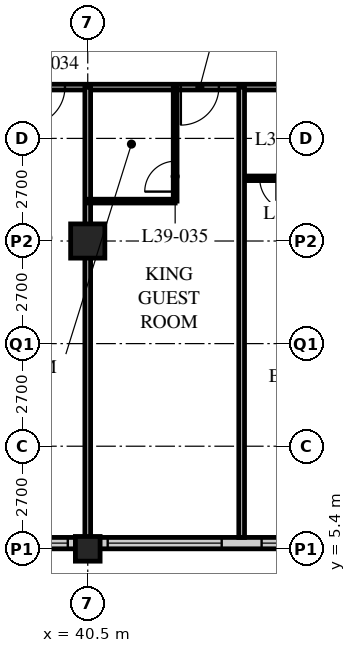
"""IFC4 building model, lengths in metres.
Left out: names, types, materials, properties, quantities, classifications, styles, units other than length and angle.
Written with IfcOpenShell. Run it as: python <this file> out.ifc"""

import sys

from ifc_helpers import new_model, si_unit, direction, frame, frame_2d, origin, origin_2d, place, context, subcontext, project, spatial, rectangle, hollow_rectangle, extrude, element, fill, save


model = new_model("IFC4")
c1 = context("Model", 3, precision=1e-05, world=origin(), true_north=direction((0.0, 1.0)))
c2 = subcontext(c1, "Body", "Model", "MODEL_VIEW")
j1 = project(units=[si_unit("LENGTHUNIT", "METRE"), si_unit("PLANEANGLEUNIT", "RADIAN")], contexts=[c1])
p1 = place(None, origin())
s1 = spatial("IfcSite", under=j1, at=p1, CompositionType="ELEMENT")
p2 = place(p1, origin())
s2 = spatial("IfcBuilding", under=s1, at=p2, CompositionType="ELEMENT")
p3 = place(p2, frame((0.0, 0.0, 151.0)))
s3 = spatial("IfcBuildingStorey", under=s2, at=p3, CompositionType="ELEMENT", Elevation=151.0)
p4 = place(p3, frame((40.5, 5.4, 0.0), z_axis=(0.0, 0.0, 1.0), x_axis=(1.0, 0.0, 0.0)))
e1 = element("IfcColumn", 1, at=p4, inside=s3, PredefinedType="COLUMN", context=c2, shape_type="SweptSolid", body=[
    extrude(hollow_rectangle(XDim=0.65, YDim=0.65, WallThickness=0.055, at=origin_2d()), origin(), (0.0, 0.0, 1.0), 3.4),
])
p5 = place(p3, frame((40.5, 13.5, 0.0), z_axis=(0.0, 0.0, 1.0), x_axis=(1.0, 0.0, 0.0)))
e2 = element("IfcColumn", 2, at=p5, inside=s3, PredefinedType="COLUMN", context=c2, shape_type="SweptSolid", body=[
    extrude(hollow_rectangle(XDim=0.9, YDim=0.9, WallThickness=0.1, at=origin_2d()), origin(), (0.0, 0.0, 1.0), 3.4),
])
p6 = place(p3, frame((8.4, 5.55, 0.0), z_axis=(0.0, 0.0, 1.0), x_axis=(1.0, 0.0, 0.0)))
e3 = element("IfcWall", 3, at=p6, inside=s3, PredefinedType="SOLIDWALL", context=c2, shape_type="SweptSolid", body=[
    extrude(rectangle(XDim=40.2, YDim=0.3, at=frame_2d((20.1, 0.0))), origin(), (0.0, 0.0, 1.0), 3.19),
])
p7 = place(p6, frame((0.225, 0.0, 0.9)))
e4 = element("IfcOpeningElement", 4, at=p7, cuts=e3, PredefinedType="OPENING", context=c2, shape_type="SweptSolid", body=[
    extrude(rectangle(XDim=3.0, YDim=1.4, at=frame_2d((1.5, 0.7))), frame((0.0, 0.16, 0.0), z_axis=(0.0, -1.0, 0.0), x_axis=(1.0, 0.0, 0.0)), (0.0, 0.0, 1.0), 0.32),
])
p8 = place(p6, frame((4.275, 0.0, 0.9)))
e5 = element("IfcOpeningElement", 5, at=p8, cuts=e3, PredefinedType="OPENING", context=c2, shape_type="SweptSolid", body=[
    extrude(rectangle(XDim=3.0, YDim=1.4, at=frame_2d((1.5, 0.7))), frame((0.0, 0.16, 0.0), z_axis=(0.0, -1.0, 0.0), x_axis=(1.0, 0.0, 0.0)), (0.0, 0.0, 1.0), 0.32),
])
p9 = place(p6, frame((8.325, 0.0, 0.9)))
e6 = element("IfcOpeningElement", 6, at=p9, cuts=e3, PredefinedType="OPENING", context=c2, shape_type="SweptSolid", body=[
    extrude(rectangle(XDim=3.0, YDim=1.4, at=frame_2d((1.5, 0.7))), frame((0.0, 0.16, 0.0), z_axis=(0.0, -1.0, 0.0), x_axis=(1.0, 0.0, 0.0)), (0.0, 0.0, 1.0), 0.32),
])
p10 = place(p6, frame((12.375, 0.0, 0.9)))
e7 = element("IfcOpeningElement", 7, at=p10, cuts=e3, PredefinedType="OPENING", context=c2, shape_type="SweptSolid", body=[
    extrude(rectangle(XDim=3.0, YDim=1.4, at=frame_2d((1.5, 0.7))), frame((0.0, 0.16, 0.0), z_axis=(0.0, -1.0, 0.0), x_axis=(1.0, 0.0, 0.0)), (0.0, 0.0, 1.0), 0.32),
])
p11 = place(p6, frame((16.425, 0.0, 0.9)))
e8 = element("IfcOpeningElement", 8, at=p11, cuts=e3, PredefinedType="OPENING", context=c2, shape_type="SweptSolid", body=[
    extrude(rectangle(XDim=3.0, YDim=1.4, at=frame_2d((1.5, 0.7))), frame((0.0, 0.16, 0.0), z_axis=(0.0, -1.0, 0.0), x_axis=(1.0, 0.0, 0.0)), (0.0, 0.0, 1.0), 0.32),
])
p12 = place(p6, frame((20.475, 0.0, 0.9)))
e9 = element("IfcOpeningElement", 9, at=p12, cuts=e3, PredefinedType="OPENING", context=c2, shape_type="SweptSolid", body=[
    extrude(rectangle(XDim=3.0, YDim=1.4, at=frame_2d((1.5, 0.7))), frame((0.0, 0.16, 0.0), z_axis=(0.0, -1.0, 0.0), x_axis=(1.0, 0.0, 0.0)), (0.0, 0.0, 1.0), 0.32),
])
p13 = place(p6, frame((24.525, 0.0, 0.9)))
e10 = element("IfcOpeningElement", 10, at=p13, cuts=e3, PredefinedType="OPENING", context=c2, shape_type="SweptSolid", body=[
    extrude(rectangle(XDim=3.0, YDim=1.4, at=frame_2d((1.5, 0.7))), frame((0.0, 0.16, 0.0), z_axis=(0.0, -1.0, 0.0), x_axis=(1.0, 0.0, 0.0)), (0.0, 0.0, 1.0), 0.32),
])
p14 = place(p6, frame((28.575, 0.0, 0.9)))
e11 = element("IfcOpeningElement", 11, at=p14, cuts=e3, PredefinedType="OPENING", context=c2, shape_type="SweptSolid", body=[
    extrude(rectangle(XDim=3.0, YDim=1.4, at=frame_2d((1.5, 0.7))), frame((0.0, 0.16, 0.0), z_axis=(0.0, -1.0, 0.0), x_axis=(1.0, 0.0, 0.0)), (0.0, 0.0, 1.0), 0.32),
])
p15 = place(p6, frame((32.625, 0.0, 0.9)))
e12 = element("IfcOpeningElement", 12, at=p15, cuts=e3, PredefinedType="OPENING", context=c2, shape_type="SweptSolid", body=[
    extrude(rectangle(XDim=3.0, YDim=1.4, at=frame_2d((1.5, 0.7))), frame((0.0, 0.16, 0.0), z_axis=(0.0, -1.0, 0.0), x_axis=(1.0, 0.0, 0.0)), (0.0, 0.0, 1.0), 0.32),
])
p16 = place(p6, frame((36.675, 0.0, 0.9)))
e13 = element("IfcOpeningElement", 13, at=p16, cuts=e3, PredefinedType="OPENING", context=c2, shape_type="SweptSolid", body=[
    extrude(rectangle(XDim=3.0, YDim=1.4, at=frame_2d((1.5, 0.7))), frame((0.0, 0.16, 0.0), z_axis=(0.0, -1.0, 0.0), x_axis=(1.0, 0.0, 0.0)), (0.0, 0.0, 1.0), 0.32),
])
p17 = place(p3, frame((8.1, 17.55, 0.0), z_axis=(0.0, 0.0, 1.0), x_axis=(1.0, 0.0, 0.0)))
e14 = element("IfcWall", 14, at=p17, inside=s3, PredefinedType="PARTITIONING", context=c2, shape_type="SweptSolid", body=[
    extrude(rectangle(XDim=40.5, YDim=0.15, at=frame_2d((20.25, 0.0))), origin(), (0.0, 0.0, 1.0), 3.19),
])
p18 = place(p17, frame((10.0, 0.0, 0.0)))
e15 = element("IfcOpeningElement", 15, at=p18, cuts=e14, PredefinedType="OPENING", context=c2, shape_type="SweptSolid", body=[
    extrude(rectangle(XDim=1.0, YDim=2.1, at=frame_2d((0.5, 1.05))), frame((0.0, 0.085, 0.0), z_axis=(0.0, -1.0, 0.0), x_axis=(1.0, 0.0, 0.0)), (0.0, 0.0, 1.0), 0.17),
])
p19 = place(p17, frame((22.15, 0.0, 0.0)))
e16 = element("IfcOpeningElement", 16, at=p19, cuts=e14, PredefinedType="OPENING", context=c2, shape_type="SweptSolid", body=[
    extrude(rectangle(XDim=1.0, YDim=2.1, at=frame_2d((0.5, 1.05))), frame((0.0, 0.085, 0.0), z_axis=(0.0, -1.0, 0.0), x_axis=(1.0, 0.0, 0.0)), (0.0, 0.0, 1.0), 0.17),
])
p20 = place(p17, frame((30.8, 0.0, 0.0)))
e17 = element("IfcOpeningElement", 17, at=p20, cuts=e14, PredefinedType="OPENING", context=c2, shape_type="SweptSolid", body=[
    extrude(rectangle(XDim=1.0, YDim=2.1, at=frame_2d((0.5, 1.05))), frame((0.0, 0.085, 0.0), z_axis=(0.0, -1.0, 0.0), x_axis=(1.0, 0.0, 0.0)), (0.0, 0.0, 1.0), 0.17),
])
p21 = place(p17, frame((34.85, 0.0, 0.0)))
e18 = element("IfcOpeningElement", 18, at=p21, cuts=e14, PredefinedType="OPENING", context=c2, shape_type="SweptSolid", body=[
    extrude(rectangle(XDim=1.0, YDim=2.1, at=frame_2d((0.5, 1.05))), frame((0.0, 0.085, 0.0), z_axis=(0.0, -1.0, 0.0), x_axis=(1.0, 0.0, 0.0)), (0.0, 0.0, 1.0), 0.17),
])
p22 = place(p17, frame((1.525, 0.0, 0.0)))
e19 = element("IfcOpeningElement", 19, at=p22, cuts=e14, PredefinedType="OPENING", context=c2, shape_type="SweptSolid", body=[
    extrude(rectangle(XDim=1.0, YDim=2.1, at=frame_2d((0.5, 1.05))), frame((0.0, 0.085, 0.0), z_axis=(0.0, -1.0, 0.0), x_axis=(1.0, 0.0, 0.0)), (0.0, 0.0, 1.0), 0.17),
])
p23 = place(p17, frame((37.975, 0.0, 0.0)))
e20 = element("IfcOpeningElement", 20, at=p23, cuts=e14, PredefinedType="OPENING", context=c2, shape_type="SweptSolid", body=[
    extrude(rectangle(XDim=1.0, YDim=2.1, at=frame_2d((0.5, 1.05))), frame((0.0, 0.085, 0.0), z_axis=(0.0, -1.0, 0.0), x_axis=(1.0, 0.0, 0.0)), (0.0, 0.0, 1.0), 0.17),
])
p24 = place(p3, frame((40.5, 17.55, 0.0), z_axis=(0.0, 0.0, 1.0), x_axis=(0.0, -1.0, 0.0)))
e21 = element("IfcWall", 21, at=p24, inside=s3, PredefinedType="PARTITIONING", context=c2, shape_type="SweptSolid", body=[
    extrude(rectangle(XDim=11.85, YDim=0.15, at=frame_2d((5.925, 0.0))), origin(), (0.0, 0.0, 1.0), 2.42),
])
p25 = place(p3, frame((40.5, 14.55, 0.0), z_axis=(0.0, 0.0, 1.0), x_axis=(1.0, 0.0, 0.0)))
e22 = element("IfcWall", 22, at=p25, inside=s3, PredefinedType="PARTITIONING", context=c2, shape_type="SweptSolid", body=[
    extrude(rectangle(XDim=2.3, YDim=0.1, at=frame_2d((1.15, 0.0))), origin(), (0.0, 0.0, 1.0), 3.19),
])
p26 = place(p3, frame((42.8, 17.55, 0.0), z_axis=(0.0, 0.0, 1.0), x_axis=(0.0, -1.0, 0.0)))
e23 = element("IfcWall", 23, at=p26, inside=s3, PredefinedType="PARTITIONING", context=c2, shape_type="SweptSolid", body=[
    extrude(rectangle(XDim=3.0, YDim=0.1, at=frame_2d((1.5, 0.0))), origin(), (0.0, 0.0, 1.0), 3.19),
])
p27 = place(p26, frame((1.95, 0.0, 0.0)))
e24 = element("IfcOpeningElement", 24, at=p27, cuts=e23, PredefinedType="OPENING", context=c2, shape_type="SweptSolid", body=[
    extrude(rectangle(XDim=0.8, YDim=2.1, at=frame_2d((0.4, 1.05))), frame((0.0, 0.06, 0.0), z_axis=(0.0, -1.0, 0.0), x_axis=(1.0, 0.0, 0.0)), (0.0, 0.0, 1.0), 0.12),
])
p28 = place(p3, frame((44.55, 15.15, 0.0), z_axis=(0.0, 0.0, 1.0), x_axis=(1.0, 0.0, 0.0)))
e25 = element("IfcWall", 25, at=p28, inside=s3, PredefinedType="PARTITIONING", context=c2, shape_type="SweptSolid", body=[
    extrude(rectangle(XDim=8.05, YDim=0.12, at=frame_2d((4.025, 0.0))), origin(), (0.0, 0.0, 1.0), 3.19),
])
p29 = place(p28, frame((0.475, 0.0, 0.0)))
e26 = element("IfcOpeningElement", 26, at=p29, cuts=e25, PredefinedType="OPENING", context=c2, shape_type="SweptSolid", body=[
    extrude(rectangle(XDim=0.85, YDim=2.1, at=frame_2d((0.425, 1.05))), frame((0.0, 0.07, 0.0), z_axis=(0.0, -1.0, 0.0), x_axis=(1.0, 0.0, 0.0)), (0.0, 0.0, 1.0), 0.14),
])
p30 = place(p28, frame((4.325, 0.0, 0.0)))
e27 = element("IfcOpeningElement", 27, at=p30, cuts=e25, PredefinedType="OPENING", context=c2, shape_type="SweptSolid", body=[
    extrude(rectangle(XDim=0.85, YDim=2.1, at=frame_2d((0.425, 1.05))), frame((0.0, 0.07, 0.0), z_axis=(0.0, -1.0, 0.0), x_axis=(1.0, 0.0, 0.0)), (0.0, 0.0, 1.0), 0.14),
])
p31 = place(p3, frame((44.55, 17.55, 0.0), z_axis=(0.0, 0.0, 1.0), x_axis=(0.0, -1.0, 0.0)))
e28 = element("IfcWall", 28, at=p31, inside=s3, PredefinedType="PARTITIONING", context=c2, shape_type="SweptSolid", body=[
    extrude(rectangle(XDim=11.85, YDim=0.15, at=frame_2d((5.925, 0.0))), origin(), (0.0, 0.0, 1.0), 3.19),
])
p32 = place(p14, origin())
e29 = element("IfcWindow", 29, at=p32, inside=s3, PartitioningType="SINGLE_PANEL", PredefinedType="WINDOW", context=c2, shape_type="SweptSolid", body=[
    extrude(rectangle(XDim=3.0, YDim=1.4, at=frame_2d((1.5, 0.7))), frame((0.0, 0.03, 0.0), z_axis=(0.0, -1.0, 0.0), x_axis=(1.0, 0.0, 0.0)), (0.0, 0.0, 1.0), 0.06),
])
fill(e11, e29)
p33 = place(p15, origin())
e30 = element("IfcWindow", 30, at=p33, inside=s3, PartitioningType="SINGLE_PANEL", PredefinedType="WINDOW", context=c2, shape_type="SweptSolid", body=[
    extrude(rectangle(XDim=3.0, YDim=1.4, at=frame_2d((1.5, 0.7))), frame((0.0, 0.03, 0.0), z_axis=(0.0, -1.0, 0.0), x_axis=(1.0, 0.0, 0.0)), (0.0, 0.0, 1.0), 0.06),
])
fill(e12, e30)
p34 = place(p16, origin())
e31 = element("IfcWindow", 31, at=p34, inside=s3, PartitioningType="SINGLE_PANEL", PredefinedType="WINDOW", context=c2, shape_type="SweptSolid", body=[
    extrude(rectangle(XDim=3.0, YDim=1.4, at=frame_2d((1.5, 0.7))), frame((0.0, 0.03, 0.0), z_axis=(0.0, -1.0, 0.0), x_axis=(1.0, 0.0, 0.0)), (0.0, 0.0, 1.0), 0.06),
])
fill(e13, e31)
p35 = place(p20, origin())
e32 = element("IfcDoor", 32, at=p35, inside=s3, OperationType="SINGLE_SWING_RIGHT", PredefinedType="DOOR", context=c2, shape_type="SweptSolid", body=[
    extrude(rectangle(XDim=1.0, YDim=2.1, at=frame_2d((0.5, 1.05))), frame((0.0, 0.025, 0.0), z_axis=(0.0, -1.0, 0.0), x_axis=(1.0, 0.0, 0.0)), (0.0, 0.0, 1.0), 0.05),
])
fill(e17, e32)
p36 = place(p27, origin())
e33 = element("IfcDoor", 33, at=p36, inside=s3, OperationType="SINGLE_SWING_LEFT", PredefinedType="DOOR", context=c2, shape_type="SweptSolid", body=[
    extrude(rectangle(XDim=0.8, YDim=2.1, at=frame_2d((0.4, 1.05))), frame((0.0, 0.025, 0.0), z_axis=(0.0, -1.0, 0.0), x_axis=(1.0, 0.0, 0.0)), (0.0, 0.0, 1.0), 0.05),
])
fill(e24, e33)
p37 = place(p21, origin())
e34 = element("IfcDoor", 34, at=p37, inside=s3, OperationType="SINGLE_SWING_RIGHT", PredefinedType="DOOR", context=c2, shape_type="SweptSolid", body=[
    extrude(rectangle(XDim=1.0, YDim=2.1, at=frame_2d((0.5, 1.05))), frame((0.0, 0.025, 0.0), z_axis=(0.0, -1.0, 0.0), x_axis=(1.0, 0.0, 0.0)), (0.0, 0.0, 1.0), 0.05),
])
fill(e18, e34)
p38 = place(p29, origin())
e35 = element("IfcDoor", 35, at=p38, inside=s3, OperationType="SINGLE_SWING_LEFT", PredefinedType="DOOR", context=c2, shape_type="SweptSolid", body=[
    extrude(rectangle(XDim=0.85, YDim=2.1, at=frame_2d((0.425, 1.05))), frame((0.0, 0.025, 0.0), z_axis=(0.0, -1.0, 0.0), x_axis=(1.0, 0.0, 0.0)), (0.0, 0.0, 1.0), 0.05),
])
fill(e26, e35)
save(model, sys.argv[1])
